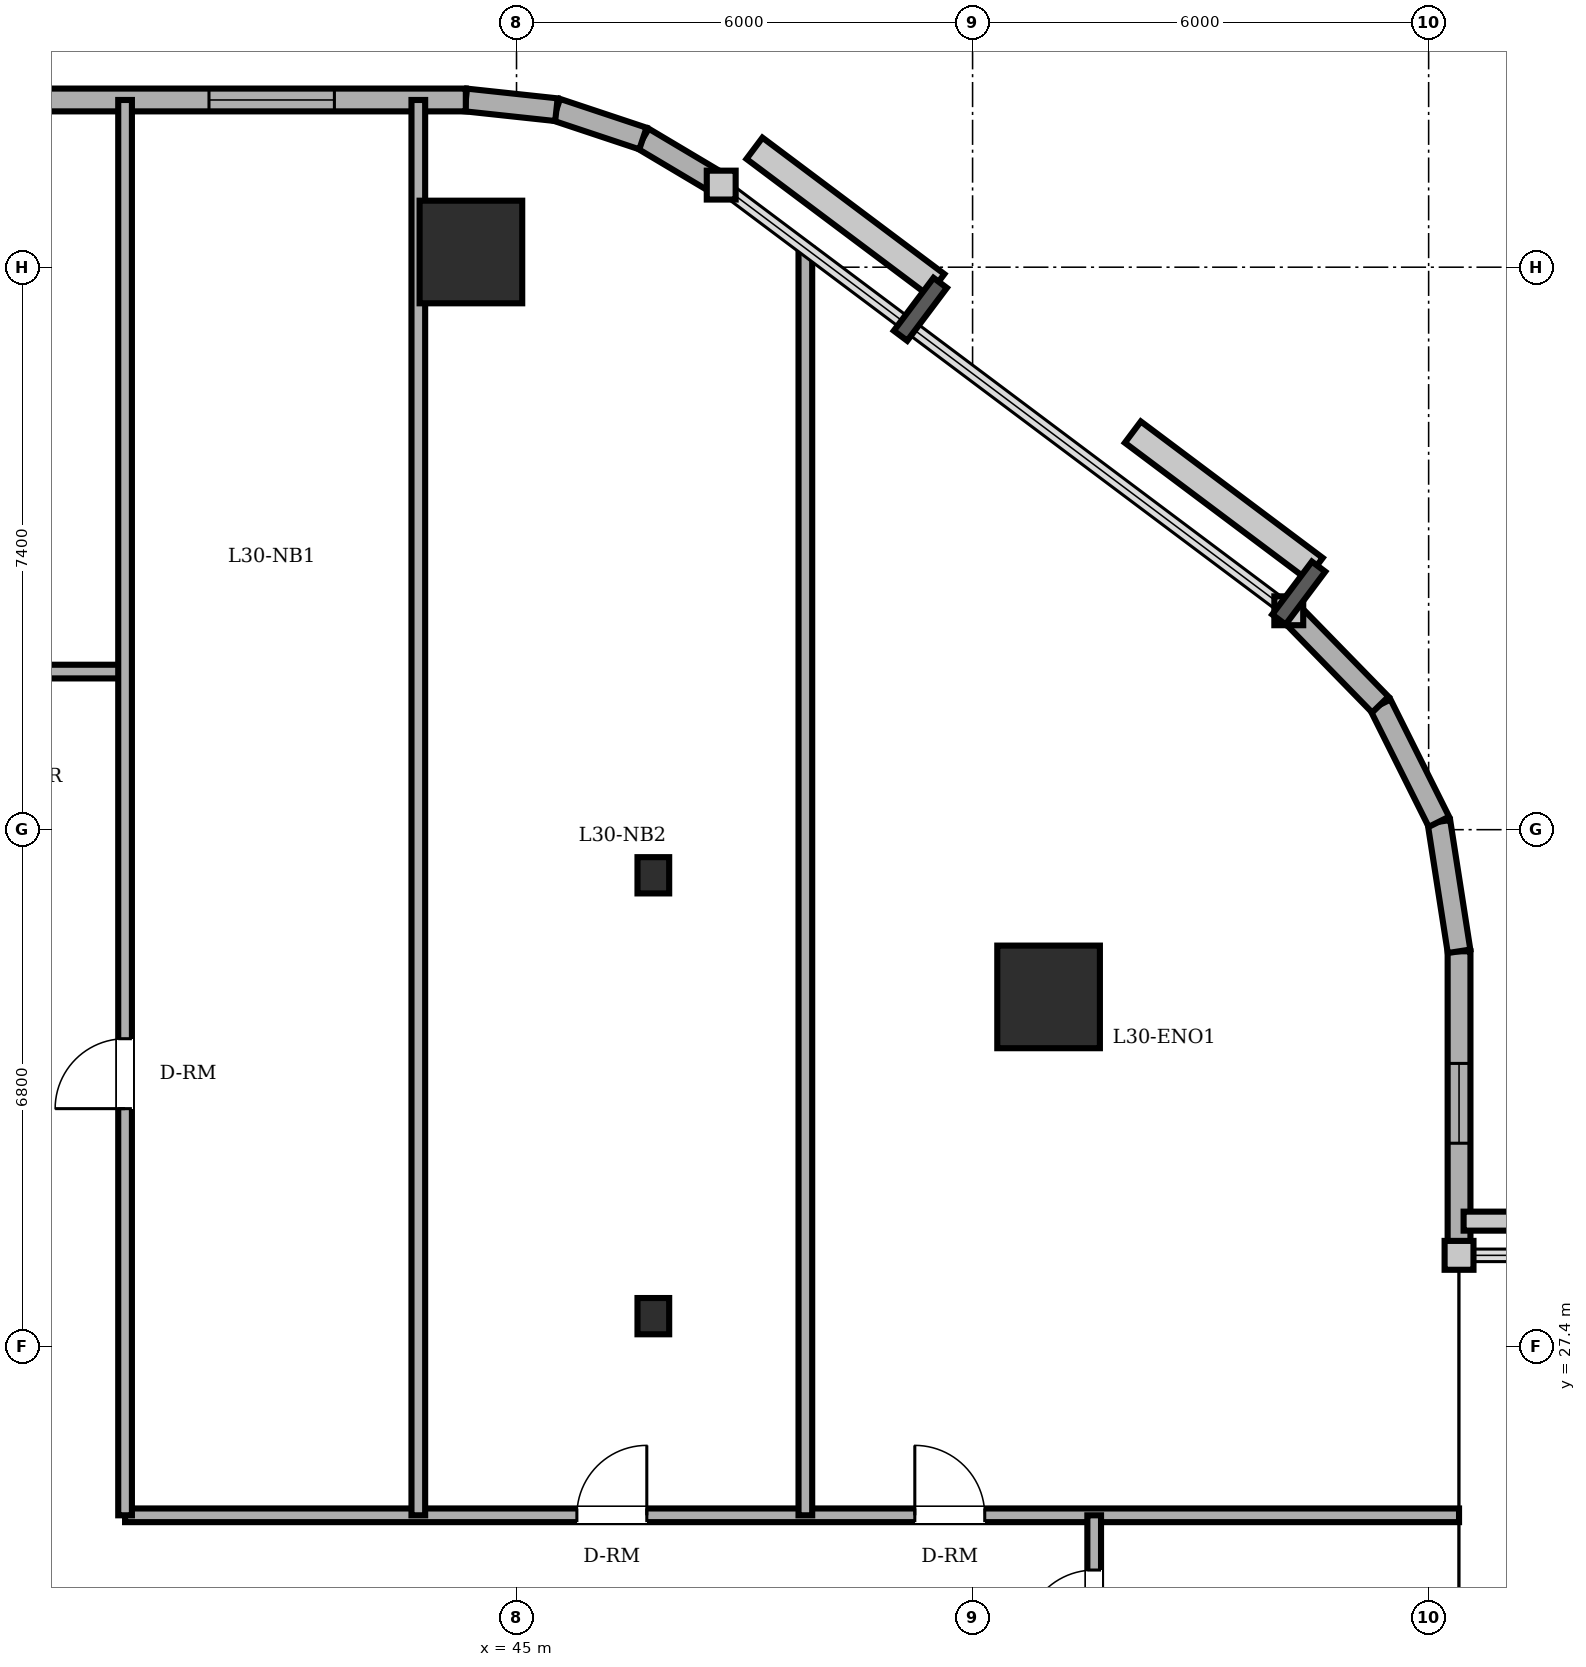
"""IFC4 building model, lengths in metres.
Left out: names, types, materials, properties, quantities, classifications, styles, units other than length and angle.
Written with IfcOpenShell. Run it as: python <this file> out.ifc"""

import sys

from ifc_helpers import new_model, si_unit, direction, frame, frame_2d, origin, origin_2d, place, context, subcontext, project, spatial, rectangle, circle, i_section, extrude, element, fill, save


model = new_model("IFC4")
c1 = context("Model", 3, precision=1e-05, world=origin(), true_north=direction((0.0, 1.0)))
c2 = subcontext(c1, "Body", "Model", "MODEL_VIEW")
j1 = project(units=[si_unit("LENGTHUNIT", "METRE"), si_unit("PLANEANGLEUNIT", "RADIAN")], contexts=[c1])
p1 = place(None, origin())
s1 = spatial("IfcSite", under=j1, at=p1, CompositionType="ELEMENT")
p2 = place(p1, origin())
s2 = spatial("IfcBuilding", under=s1, at=p2, CompositionType="ELEMENT")
p3 = place(p2, frame((0.0, 0.0, 115.1)))
s3 = spatial("IfcBuildingStorey", under=s2, at=p3, CompositionType="ELEMENT", Elevation=115.1)
for number, where, z_axis, x_axis in (
    (1, (52.0, 32.0, 0.0), (0.0, 0.0, 1.0), (1.0, 0.0, 0.0)),
    (2, (44.4, 41.8, 0.0), (0.0, 0.0, 1.0), (1.0, 0.0, 0.0)),
):
    element("IfcColumn", number, at=place(p3, frame(where, z_axis=z_axis, x_axis=x_axis)), inside=s3, PredefinedType="COLUMN", context=c2, shape_type="SweptSolid", body=[
        extrude(circle(Radius=0.675, at=origin_2d()), origin(), (0.0, 0.0, 1.0), 3.6),
    ])
for number, where, z_axis, x_axis in (
    (3, (46.8, 27.8, 0.0), (0.0, 0.0, 1.0), (1.0, 0.0, 0.0)),
    (4, (46.8, 33.6, 0.0), (0.0, 0.0, 1.0), (1.0, 0.0, 0.0)),
):
    element("IfcColumn", number, at=place(p3, frame(where, z_axis=z_axis, x_axis=x_axis)), inside=s3, PredefinedType="COLUMN", context=c2, shape_type="SweptSolid", body=[
        extrude(i_section(OverallWidth=0.417, OverallDepth=0.477, WebThickness=0.036, FlangeThickness=0.057, FilletRadius=0.015, at=origin_2d()), origin(), (0.0, 0.0, 1.0), 3.6),
    ])
p4 = place(p3, frame((57.4, 28.6, 0.0), z_axis=(0.0, 0.0, 1.0), x_axis=(0.0, 1.0, 0.0)))
e5 = element("IfcWall", 5, at=p4, inside=s3, PredefinedType="SOLIDWALL", context=c2, shape_type="SweptSolid", body=[
    extrude(rectangle(XDim=4.0, YDim=0.3, at=frame_2d((2.0, 0.0))), origin(), (0.0, 0.0, 1.0), 3.4),
])
p5 = place(p4, frame((1.475, 0.0, 0.85)))
e6 = element("IfcOpeningElement", 6, at=p5, cuts=e5, PredefinedType="OPENING", context=c2, shape_type="SweptSolid", body=[
    extrude(rectangle(XDim=1.05, YDim=1.55, at=frame_2d((0.525, 0.775))), frame((0.0, 0.16, 0.0), z_axis=(0.0, -1.0, 0.0), x_axis=(1.0, 0.0, 0.0)), (0.0, 0.0, 1.0), 0.32),
])
p6 = place(p3, frame((57.4, 32.6, 0.0), z_axis=(0.0, 0.0, 1.0), x_axis=(-0.153620989032, 0.988129845581, 0.0)))
e7 = element("IfcWall", 7, at=p6, inside=s3, PredefinedType="SOLIDWALL", context=c2, shape_type="SweptSolid", body=[
    extrude(rectangle(XDim=1.724, YDim=0.3, at=frame_2d((0.862, 0.0))), origin(), (0.0, 0.0, 1.0), 3.4),
])
for number, where, z_axis, x_axis in (
    (8, (57.135, 34.304, 0.0), (0.0, 0.0, 1.0), (-0.447, 0.894, 0.0)),
    (9, (56.364, 35.846, 0.0), (0.0, 0.0, 1.0), (-0.698, 0.716, 0.0)),
):
    element("IfcWall", number, at=place(p3, frame(where, z_axis=z_axis, x_axis=x_axis)), inside=s3, PredefinedType="SOLIDWALL", context=c2, shape_type="SweptSolid", body=[
        extrude(rectangle(XDim=1.724, YDim=0.3, at=frame_2d((0.862, 0.0))), origin(), (0.0, 0.0, 1.0), 3.4),
    ])
p7 = place(p3, frame((47.693, 42.68, 0.0), z_axis=(0.0, 0.0, 1.0), x_axis=(-0.859320591642, 0.511437308749, 0.0)))
e10 = element("IfcWall", 10, at=p7, inside=s3, PredefinedType="SOLIDWALL", context=c2, shape_type="SweptSolid", body=[
    extrude(rectangle(XDim=1.199, YDim=0.3, at=frame_2d((0.599, 0.0))), origin(), (0.0, 0.0, 1.0), 3.4),
])
p8 = place(p3, frame((46.663, 43.293, 0.0), z_axis=(0.0, 0.0, 1.0), x_axis=(-0.948744332129, 0.316044604847, 0.0)))
e11 = element("IfcWall", 11, at=p8, inside=s3, PredefinedType="SOLIDWALL", context=c2, shape_type="SweptSolid", body=[
    extrude(rectangle(XDim=1.2, YDim=0.3, at=frame_2d((0.6, 0.0))), origin(), (0.0, 0.0, 1.0), 3.4),
])
p9 = place(p3, frame((45.525, 43.672, 0.0), z_axis=(0.0, 0.0, 1.0), x_axis=(-0.994289103787, 0.106720092254, 0.0)))
e12 = element("IfcWall", 12, at=p9, inside=s3, PredefinedType="SOLIDWALL", context=c2, shape_type="SweptSolid", body=[
    extrude(rectangle(XDim=1.199, YDim=0.3, at=frame_2d((0.599, 0.0))), origin(), (0.0, 0.0, 1.0), 3.4),
])
p10 = place(p3, frame((44.333, 43.8, 0.0), z_axis=(0.0, 0.0, 1.0), x_axis=(-1.0, 0.0, 0.0)))
e13 = element("IfcWall", 13, at=p10, inside=s3, PredefinedType="SOLIDWALL", context=c2, shape_type="SweptSolid", body=[
    extrude(rectangle(XDim=29.933, YDim=0.3, at=frame_2d((14.967, 0.0))), origin(), (0.0, 0.0, 1.0), 3.4),
])
p11 = place(p10, frame((25.258, 0.0, 0.0)))
e14 = element("IfcOpeningElement", 14, at=p11, cuts=e13, PredefinedType="OPENING", context=c2, shape_type="SweptSolid", body=[
    extrude(rectangle(XDim=0.95, YDim=2.2, at=frame_2d((0.475, 1.1))), frame((0.0, 0.16, 0.0), z_axis=(0.0, -1.0, 0.0), x_axis=(1.0, 0.0, 0.0)), (0.0, 0.0, 1.0), 0.32),
])
p12 = place(p10, frame((1.729, 0.0, 0.85)))
e15 = element("IfcOpeningElement", 15, at=p12, cuts=e13, PredefinedType="OPENING", context=c2, shape_type="SweptSolid", body=[
    extrude(rectangle(XDim=1.65, YDim=1.55, at=frame_2d((0.825, 0.775))), frame((0.0, 0.16, 0.0), z_axis=(0.0, -1.0, 0.0), x_axis=(1.0, 0.0, 0.0)), (0.0, 0.0, 1.0), 0.32),
])
p13 = place(p10, frame((6.341, 0.0, 0.85)))
e16 = element("IfcOpeningElement", 16, at=p13, cuts=e13, PredefinedType="OPENING", context=c2, shape_type="SweptSolid", body=[
    extrude(rectangle(XDim=1.65, YDim=1.55, at=frame_2d((0.825, 0.775))), frame((0.0, 0.16, 0.0), z_axis=(0.0, -1.0, 0.0), x_axis=(1.0, 0.0, 0.0)), (0.0, 0.0, 1.0), 0.32),
])
p14 = place(p10, frame((9.025, 0.0, 0.85)))
e17 = element("IfcOpeningElement", 17, at=p14, cuts=e13, PredefinedType="OPENING", context=c2, shape_type="SweptSolid", body=[
    extrude(rectangle(XDim=1.65, YDim=1.55, at=frame_2d((0.825, 0.775))), frame((0.0, 0.16, 0.0), z_axis=(0.0, -1.0, 0.0), x_axis=(1.0, 0.0, 0.0)), (0.0, 0.0, 1.0), 0.32),
])
p15 = place(p10, frame((14.108, 0.0, 0.85)))
e18 = element("IfcOpeningElement", 18, at=p15, cuts=e13, PredefinedType="OPENING", context=c2, shape_type="SweptSolid", body=[
    extrude(rectangle(XDim=1.65, YDim=1.55, at=frame_2d((0.825, 0.775))), frame((0.0, 0.16, 0.0), z_axis=(0.0, -1.0, 0.0), x_axis=(1.0, 0.0, 0.0)), (0.0, 0.0, 1.0), 0.32),
])
p16 = place(p10, frame((16.508, 0.0, 0.85)))
e19 = element("IfcOpeningElement", 19, at=p16, cuts=e13, PredefinedType="OPENING", context=c2, shape_type="SweptSolid", body=[
    extrude(rectangle(XDim=1.65, YDim=1.55, at=frame_2d((0.825, 0.775))), frame((0.0, 0.16, 0.0), z_axis=(0.0, -1.0, 0.0), x_axis=(1.0, 0.0, 0.0)), (0.0, 0.0, 1.0), 0.32),
])
p17 = place(p10, frame((22.191, 0.0, 0.85)))
e20 = element("IfcOpeningElement", 20, at=p17, cuts=e13, PredefinedType="OPENING", context=c2, shape_type="SweptSolid", body=[
    extrude(rectangle(XDim=1.65, YDim=1.55, at=frame_2d((0.825, 0.775))), frame((0.0, 0.16, 0.0), z_axis=(0.0, -1.0, 0.0), x_axis=(1.0, 0.0, 0.0)), (0.0, 0.0, 1.0), 0.32),
])
p18 = place(p3, frame((39.85, 25.18, 0.0), z_axis=(0.0, 0.0, 1.0), x_axis=(1.0, 0.0, 0.0)))
e21 = element("IfcWall", 21, at=p18, inside=s3, PredefinedType="PARTITIONING", context=c2, shape_type="SweptSolid", body=[
    extrude(rectangle(XDim=17.55, YDim=0.18, at=frame_2d((8.775, 0.0))), origin(), (0.0, 0.0, 1.0), 3.4),
])
p19 = place(p18, frame((5.944, 0.0, 0.0)))
e22 = element("IfcOpeningElement", 22, at=p19, cuts=e21, PredefinedType="OPENING", context=c2, shape_type="SweptSolid", body=[
    extrude(rectangle(XDim=0.92, YDim=2.1, at=frame_2d((0.46, 1.05))), frame((0.0, 0.1, 0.0), z_axis=(0.0, -1.0, 0.0), x_axis=(1.0, 0.0, 0.0)), (0.0, 0.0, 1.0), 0.2),
])
p20 = place(p18, frame((10.39, 0.0, 0.0)))
e23 = element("IfcOpeningElement", 23, at=p20, cuts=e21, PredefinedType="OPENING", context=c2, shape_type="SweptSolid", body=[
    extrude(rectangle(XDim=0.92, YDim=2.1, at=frame_2d((0.46, 1.05))), frame((0.0, 0.1, 0.0), z_axis=(0.0, -1.0, 0.0), x_axis=(1.0, 0.0, 0.0)), (0.0, 0.0, 1.0), 0.2),
])
p21 = place(p3, frame((8.8, 36.28, 0.0), z_axis=(0.0, 0.0, 1.0), x_axis=(1.0, 0.0, 0.0)))
e24 = element("IfcWall", 24, at=p21, inside=s3, PredefinedType="PARTITIONING", context=c2, shape_type="SweptSolid", body=[
    extrude(rectangle(XDim=31.05, YDim=0.18, at=frame_2d((15.525, 0.0))), origin(), (0.0, 0.0, 1.0), 3.4),
])
p22 = place(p21, frame((17.05, 0.0, 0.0)))
e25 = element("IfcOpeningElement", 25, at=p22, cuts=e24, PredefinedType="OPENING", context=c2, shape_type="SweptSolid", body=[
    extrude(rectangle(XDim=0.9, YDim=2.1, at=frame_2d((0.45, 1.05))), frame((0.0, 0.1, 0.0), z_axis=(0.0, -1.0, 0.0), x_axis=(1.0, 0.0, 0.0)), (0.0, 0.0, 1.0), 0.2),
])
p23 = place(p21, frame((20.67, 0.0, 0.0)))
e26 = element("IfcOpeningElement", 26, at=p23, cuts=e24, PredefinedType="OPENING", context=c2, shape_type="SweptSolid", body=[
    extrude(rectangle(XDim=0.86, YDim=2.1, at=frame_2d((0.43, 1.05))), frame((0.0, 0.1, 0.0), z_axis=(0.0, -1.0, 0.0), x_axis=(1.0, 0.0, 0.0)), (0.0, 0.0, 1.0), 0.2),
])
p24 = place(p21, frame((8.04, 0.0, 0.0)))
e27 = element("IfcOpeningElement", 27, at=p24, cuts=e24, PredefinedType="OPENING", context=c2, shape_type="SweptSolid", body=[
    extrude(rectangle(XDim=0.92, YDim=2.1, at=frame_2d((0.46, 1.05))), frame((0.0, 0.1, 0.0), z_axis=(0.0, -1.0, 0.0), x_axis=(1.0, 0.0, 0.0)), (0.0, 0.0, 1.0), 0.2),
])
p25 = place(p21, frame((26.305, 0.0, 0.0)))
e28 = element("IfcOpeningElement", 28, at=p25, cuts=e24, PredefinedType="OPENING", context=c2, shape_type="SweptSolid", body=[
    extrude(rectangle(XDim=0.92, YDim=2.1, at=frame_2d((0.46, 1.05))), frame((0.0, 0.1, 0.0), z_axis=(0.0, -1.0, 0.0), x_axis=(1.0, 0.0, 0.0)), (0.0, 0.0, 1.0), 0.2),
])
p26 = place(p3, frame((39.85, 25.18, 0.0), z_axis=(0.0, 0.0, 1.0), x_axis=(0.0, 1.0, 0.0)))
e29 = element("IfcWall", 29, at=p26, inside=s3, PredefinedType="PARTITIONING", context=c2, shape_type="SweptSolid", body=[
    extrude(rectangle(XDim=18.62, YDim=0.18, at=frame_2d((9.31, 0.0))), origin(), (0.0, 0.0, 1.0), 3.4),
])
p27 = place(p26, frame((5.35, 0.0, 0.0)))
e30 = element("IfcOpeningElement", 30, at=p27, cuts=e29, PredefinedType="OPENING", context=c2, shape_type="SweptSolid", body=[
    extrude(rectangle(XDim=0.92, YDim=2.1, at=frame_2d((0.46, 1.05))), frame((0.0, 0.1, 0.0), z_axis=(0.0, -1.0, 0.0), x_axis=(1.0, 0.0, 0.0)), (0.0, 0.0, 1.0), 0.2),
])
p28 = place(p3, frame((43.708, 25.18, 0.0), z_axis=(0.0, 0.0, 1.0), x_axis=(0.0, 1.0, 0.0)))
e31 = element("IfcWall", 31, at=p28, inside=s3, PredefinedType="PARTITIONING", context=c2, shape_type="SweptSolid", body=[
    extrude(rectangle(XDim=18.62, YDim=0.18, at=frame_2d((9.31, 0.0))), origin(), (0.0, 0.0, 1.0), 3.4),
])
p29 = place(p3, frame((48.8, 25.18, 0.0), z_axis=(0.0, 0.0, 1.0), x_axis=(0.0, 1.0, 0.0)))
e32 = element("IfcWall", 32, at=p29, inside=s3, PredefinedType="PARTITIONING", context=c2, shape_type="SweptSolid", body=[
    extrude(rectangle(XDim=16.67, YDim=0.18, at=frame_2d((8.335, 0.0))), origin(), (0.0, 0.0, 1.0), 3.4),
])
p30 = place(p3, frame((52.6, 22.82, 0.0), z_axis=(0.0, 0.0, 1.0), x_axis=(0.0, 1.0, 0.0)))
e33 = element("IfcWall", 33, at=p30, inside=s3, PredefinedType="PARTITIONING", context=c2, shape_type="SweptSolid", body=[
    extrude(rectangle(XDim=2.36, YDim=0.18, at=frame_2d((1.18, 0.0))), origin(), (0.0, 0.0, 1.0), 3.4),
])
p31 = place(p30, frame((0.72, 0.0, 0.0)))
e34 = element("IfcOpeningElement", 34, at=p31, cuts=e33, PredefinedType="OPENING", context=c2, shape_type="SweptSolid", body=[
    extrude(rectangle(XDim=0.92, YDim=2.1, at=frame_2d((0.46, 1.05))), frame((0.0, 0.1, 0.0), z_axis=(0.0, -1.0, 0.0), x_axis=(1.0, 0.0, 0.0)), (0.0, 0.0, 1.0), 0.2),
])
p32 = place(p5, origin())
e35 = element("IfcWindow", 35, at=p32, inside=s3, PartitioningType="SINGLE_PANEL", PredefinedType="WINDOW", context=c2, shape_type="SweptSolid", body=[
    extrude(rectangle(XDim=1.05, YDim=1.55, at=frame_2d((0.525, 0.775))), frame((0.0, 0.03, 0.0), z_axis=(0.0, -1.0, 0.0), x_axis=(1.0, 0.0, 0.0)), (0.0, 0.0, 1.0), 0.06),
])
fill(e6, e35)
p33 = place(p12, origin())
e36 = element("IfcWindow", 36, at=p33, inside=s3, PartitioningType="DOUBLE_PANEL_VERTICAL", PredefinedType="WINDOW", context=c2, shape_type="SweptSolid", body=[
    extrude(rectangle(XDim=1.65, YDim=1.55, at=frame_2d((0.825, 0.775))), frame((0.0, 0.03, 0.0), z_axis=(0.0, -1.0, 0.0), x_axis=(1.0, 0.0, 0.0)), (0.0, 0.0, 1.0), 0.06),
])
fill(e15, e36)
p34 = place(p27, origin())
e37 = element("IfcDoor", 37, at=p34, inside=s3, OperationType="SINGLE_SWING_LEFT", PredefinedType="DOOR", context=c2, shape_type="SweptSolid", body=[
    extrude(rectangle(XDim=0.92, YDim=2.1, at=frame_2d((0.46, 1.05))), frame((0.0, 0.025, 0.0), z_axis=(0.0, -1.0, 0.0), x_axis=(1.0, 0.0, 0.0)), (0.0, 0.0, 1.0), 0.05),
])
fill(e30, e37)
p35 = place(p19, origin())
e38 = element("IfcDoor", 38, at=p35, inside=s3, OperationType="SINGLE_SWING_RIGHT", PredefinedType="DOOR", context=c2, shape_type="SweptSolid", body=[
    extrude(rectangle(XDim=0.92, YDim=2.1, at=frame_2d((0.46, 1.05))), frame((0.0, 0.025, 0.0), z_axis=(0.0, -1.0, 0.0), x_axis=(1.0, 0.0, 0.0)), (0.0, 0.0, 1.0), 0.05),
])
fill(e22, e38)
p36 = place(p20, origin())
e39 = element("IfcDoor", 39, at=p36, inside=s3, OperationType="SINGLE_SWING_LEFT", PredefinedType="DOOR", context=c2, shape_type="SweptSolid", body=[
    extrude(rectangle(XDim=0.92, YDim=2.1, at=frame_2d((0.46, 1.05))), frame((0.0, 0.025, 0.0), z_axis=(0.0, -1.0, 0.0), x_axis=(1.0, 0.0, 0.0)), (0.0, 0.0, 1.0), 0.05),
])
fill(e23, e39)
p37 = place(p31, origin())
e40 = element("IfcDoor", 40, at=p37, inside=s3, OperationType="SINGLE_SWING_LEFT", PredefinedType="DOOR", context=c2, shape_type="SweptSolid", body=[
    extrude(rectangle(XDim=0.92, YDim=2.1, at=frame_2d((0.46, 1.05))), frame((0.0, 0.025, 0.0), z_axis=(0.0, -1.0, 0.0), x_axis=(1.0, 0.0, 0.0)), (0.0, 0.0, 1.0), 0.05),
])
fill(e34, e40)
save(model, sys.argv[1])
